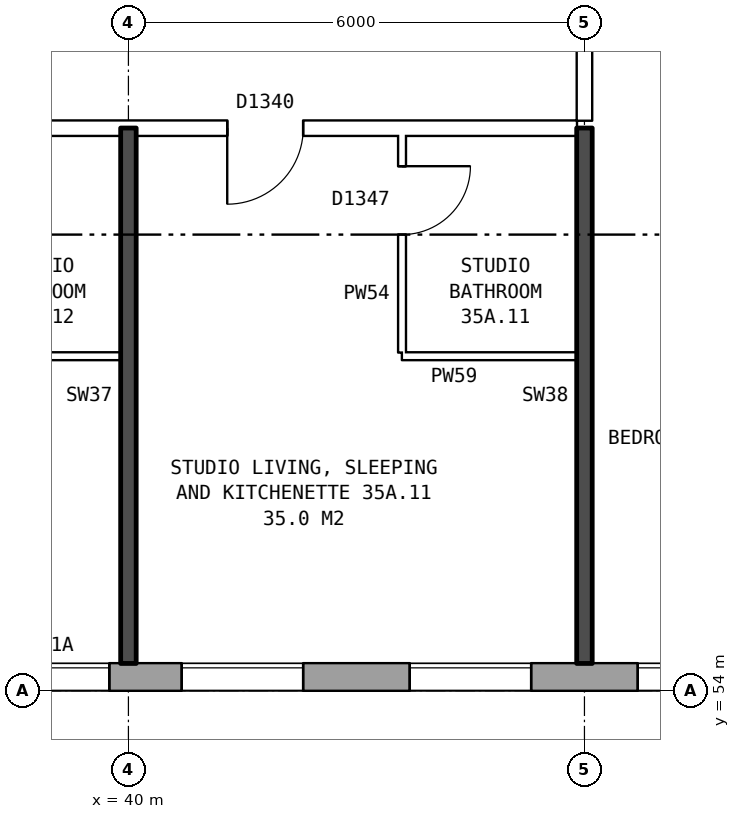
"""IFC4 building model, lengths in metres.
Left out: names, types, materials, properties, quantities, classifications, styles, units other than length and angle.
Written with IfcOpenShell. Run it as: python <this file> out.ifc"""

import sys

from ifc_helpers import new_model, si_unit, direction, frame, frame_2d, origin, place, context, subcontext, project, spatial, rectangle, extrude, element, fill, save


model = new_model("IFC4")
c1 = context("Model", 3, precision=1e-05, world=origin(), true_north=direction((0.0, 1.0)))
c2 = subcontext(c1, "Body", "Model", "MODEL_VIEW")
j1 = project(units=[si_unit("LENGTHUNIT", "METRE"), si_unit("PLANEANGLEUNIT", "RADIAN")], contexts=[c1])
p1 = place(None, origin())
s1 = spatial("IfcSite", under=j1, at=p1, CompositionType="ELEMENT")
p2 = place(p1, origin())
s2 = spatial("IfcBuilding", under=s1, at=p2, CompositionType="ELEMENT")
p3 = place(p2, frame((0.0, 0.0, 126.8)))
s3 = spatial("IfcBuildingStorey", under=s2, at=p3, CompositionType="ELEMENT", Elevation=126.8)
p4 = place(p3, frame((29.825, 54.18, 0.0), z_axis=(0.0, 0.0, 1.0), x_axis=(1.0, 0.0, 0.0)))
e1 = element("IfcWall", 1, at=p4, inside=s3, PredefinedType="STANDARD", context=c2, shape_type="SweptSolid", body=[
    extrude(rectangle(XDim=43.101, YDim=0.36, at=frame_2d((21.55, 0.0))), origin(), (0.0, 0.0, 1.0), 2.85),
])
p5 = place(p4, frame((1.875, 0.0, 0.8)))
e2 = element("IfcOpeningElement", 2, at=p5, cuts=e1, PredefinedType="OPENING", context=c2, shape_type="SweptSolid", body=[
    extrude(rectangle(XDim=1.6, YDim=1.8, at=frame_2d((0.8, 0.9))), frame((0.0, 0.19, 0.0), z_axis=(0.0, -1.0, 0.0), x_axis=(1.0, 0.0, 0.0)), (0.0, 0.0, 1.0), 0.38),
])
p6 = place(p4, frame((4.375, 0.0, 0.8)))
e3 = element("IfcOpeningElement", 3, at=p6, cuts=e1, PredefinedType="OPENING", context=c2, shape_type="SweptSolid", body=[
    extrude(rectangle(XDim=1.0, YDim=1.8, at=frame_2d((0.5, 0.9))), frame((0.0, 0.19, 0.0), z_axis=(0.0, -1.0, 0.0), x_axis=(1.0, 0.0, 0.0)), (0.0, 0.0, 1.0), 0.38),
])
p7 = place(p4, frame((5.675, 0.0, 1.6)))
e4 = element("IfcOpeningElement", 4, at=p7, cuts=e1, PredefinedType="OPENING", context=c2, shape_type="SweptSolid", body=[
    extrude(rectangle(XDim=0.6, YDim=0.9, at=frame_2d((0.3, 0.45))), frame((0.0, 0.19, 0.0), z_axis=(0.0, -1.0, 0.0), x_axis=(1.0, 0.0, 0.0)), (0.0, 0.0, 1.0), 0.38),
])
p8 = place(p4, frame((10.875, 0.0, 0.8)))
e5 = element("IfcOpeningElement", 5, at=p8, cuts=e1, PredefinedType="OPENING", context=c2, shape_type="SweptSolid", body=[
    extrude(rectangle(XDim=1.6, YDim=1.8, at=frame_2d((0.8, 0.9))), frame((0.0, 0.19, 0.0), z_axis=(0.0, -1.0, 0.0), x_axis=(1.0, 0.0, 0.0)), (0.0, 0.0, 1.0), 0.38),
])
p9 = place(p4, frame((13.875, 0.0, 0.8)))
e6 = element("IfcOpeningElement", 6, at=p9, cuts=e1, PredefinedType="OPENING", context=c2, shape_type="SweptSolid", body=[
    extrude(rectangle(XDim=1.6, YDim=1.8, at=frame_2d((0.8, 0.9))), frame((0.0, 0.19, 0.0), z_axis=(0.0, -1.0, 0.0), x_axis=(1.0, 0.0, 0.0)), (0.0, 0.0, 1.0), 0.38),
])
p10 = place(p4, frame((16.875, 0.0, 0.8)))
e7 = element("IfcOpeningElement", 7, at=p10, cuts=e1, PredefinedType="OPENING", context=c2, shape_type="SweptSolid", body=[
    extrude(rectangle(XDim=1.6, YDim=1.8, at=frame_2d((0.8, 0.9))), frame((0.0, 0.19, 0.0), z_axis=(0.0, -1.0, 0.0), x_axis=(1.0, 0.0, 0.0)), (0.0, 0.0, 1.0), 0.38),
])
p11 = place(p4, frame((19.875, 0.0, 0.8)))
e8 = element("IfcOpeningElement", 8, at=p11, cuts=e1, PredefinedType="OPENING", context=c2, shape_type="SweptSolid", body=[
    extrude(rectangle(XDim=1.6, YDim=1.8, at=frame_2d((0.8, 0.9))), frame((0.0, 0.19, 0.0), z_axis=(0.0, -1.0, 0.0), x_axis=(1.0, 0.0, 0.0)), (0.0, 0.0, 1.0), 0.38),
])
p12 = place(p4, frame((22.875, 0.0, 0.8)))
e9 = element("IfcOpeningElement", 9, at=p12, cuts=e1, PredefinedType="OPENING", context=c2, shape_type="SweptSolid", body=[
    extrude(rectangle(XDim=1.6, YDim=1.8, at=frame_2d((0.8, 0.9))), frame((0.0, 0.19, 0.0), z_axis=(0.0, -1.0, 0.0), x_axis=(1.0, 0.0, 0.0)), (0.0, 0.0, 1.0), 0.38),
])
p13 = place(p4, frame((25.875, 0.0, 0.8)))
e10 = element("IfcOpeningElement", 10, at=p13, cuts=e1, PredefinedType="OPENING", context=c2, shape_type="SweptSolid", body=[
    extrude(rectangle(XDim=1.6, YDim=1.8, at=frame_2d((0.8, 0.9))), frame((0.0, 0.19, 0.0), z_axis=(0.0, -1.0, 0.0), x_axis=(1.0, 0.0, 0.0)), (0.0, 0.0, 1.0), 0.38),
])
p14 = place(p4, frame((28.875, 0.0, 0.8)))
e11 = element("IfcOpeningElement", 11, at=p14, cuts=e1, PredefinedType="OPENING", context=c2, shape_type="SweptSolid", body=[
    extrude(rectangle(XDim=1.6, YDim=1.8, at=frame_2d((0.8, 0.9))), frame((0.0, 0.19, 0.0), z_axis=(0.0, -1.0, 0.0), x_axis=(1.0, 0.0, 0.0)), (0.0, 0.0, 1.0), 0.38),
])
p15 = place(p4, frame((31.875, 0.0, 0.8)))
e12 = element("IfcOpeningElement", 12, at=p15, cuts=e1, PredefinedType="OPENING", context=c2, shape_type="SweptSolid", body=[
    extrude(rectangle(XDim=1.6, YDim=1.8, at=frame_2d((0.8, 0.9))), frame((0.0, 0.19, 0.0), z_axis=(0.0, -1.0, 0.0), x_axis=(1.0, 0.0, 0.0)), (0.0, 0.0, 1.0), 0.38),
])
p16 = place(p4, frame((34.375, 0.0, 0.8)))
e13 = element("IfcOpeningElement", 13, at=p16, cuts=e1, PredefinedType="OPENING", context=c2, shape_type="SweptSolid", body=[
    extrude(rectangle(XDim=1.2, YDim=0.9, at=frame_2d((0.6, 0.45))), frame((0.0, 0.19, 0.0), z_axis=(0.0, -1.0, 0.0), x_axis=(1.0, 0.0, 0.0)), (0.0, 0.0, 1.0), 0.38),
])
p17 = place(p4, frame((37.875, 0.0, 0.8)))
e14 = element("IfcOpeningElement", 14, at=p17, cuts=e1, PredefinedType="OPENING", context=c2, shape_type="SweptSolid", body=[
    extrude(rectangle(XDim=1.6, YDim=1.8, at=frame_2d((0.8, 0.9))), frame((0.0, 0.19, 0.0), z_axis=(0.0, -1.0, 0.0), x_axis=(1.0, 0.0, 0.0)), (0.0, 0.0, 1.0), 0.38),
])
p18 = place(p4, frame((40.875, 0.0, 0.8)))
e15 = element("IfcOpeningElement", 15, at=p18, cuts=e1, PredefinedType="OPENING", context=c2, shape_type="SweptSolid", body=[
    extrude(rectangle(XDim=1.6, YDim=1.8, at=frame_2d((0.8, 0.9))), frame((0.0, 0.19, 0.0), z_axis=(0.0, -1.0, 0.0), x_axis=(1.0, 0.0, 0.0)), (0.0, 0.0, 1.0), 0.38),
])
p19 = place(p4, frame((7.525, 0.0, 0.8)))
e16 = element("IfcOpeningElement", 16, at=p19, cuts=e1, PredefinedType="OPENING", context=c2, shape_type="SweptSolid", body=[
    extrude(rectangle(XDim=0.6, YDim=0.9, at=frame_2d((0.3, 0.45))), frame((0.0, 0.19, 0.0), z_axis=(0.0, -1.0, 0.0), x_axis=(1.0, 0.0, 0.0)), (0.0, 0.0, 1.0), 0.38),
])
p20 = place(p4, frame((8.525, 0.0, 0.8)))
e17 = element("IfcOpeningElement", 17, at=p20, cuts=e1, PredefinedType="OPENING", context=c2, shape_type="SweptSolid", body=[
    extrude(rectangle(XDim=1.4, YDim=1.8, at=frame_2d((0.7, 0.9))), frame((0.0, 0.19, 0.0), z_axis=(0.0, -1.0, 0.0), x_axis=(1.0, 0.0, 0.0)), (0.0, 0.0, 1.0), 0.38),
])
p21 = place(p4, frame((36.725, 0.0, 1.7)))
e18 = element("IfcOpeningElement", 18, at=p21, cuts=e1, PredefinedType="OPENING", context=c2, shape_type="SweptSolid", body=[
    extrude(rectangle(XDim=0.8, YDim=0.9, at=frame_2d((0.4, 0.45))), frame((0.0, 0.19, 0.0), z_axis=(0.0, -1.0, 0.0), x_axis=(1.0, 0.0, 0.0)), (0.0, 0.0, 1.0), 0.38),
])
for number, where, z_axis, x_axis in (
    (19, (37.6, 58.4, 0.0), (0.0, 0.0, 1.0), (1.0, 0.0, 0.0)),
    (20, (43.6, 58.4, 0.0), (0.0, 0.0, 1.0), (1.0, 0.0, 0.0)),
):
    element("IfcWall", number, at=place(p3, frame(where, z_axis=z_axis, x_axis=x_axis)), inside=s3, PredefinedType="PARTITIONING", context=c2, shape_type="SweptSolid", body=[
        extrude(rectangle(XDim=2.3, YDim=0.1, at=frame_2d((1.15, 0.0))), origin(), (0.0, 0.0, 1.0), 2.85),
    ])
p22 = place(p3, frame((27.11, 61.4, 0.0), z_axis=(0.0, 0.0, 1.0), x_axis=(1.0, 0.0, 0.0)))
e21 = element("IfcWall", 21, at=p22, inside=s3, PredefinedType="PARTITIONING", context=c2, shape_type="SweptSolid", body=[
    extrude(rectangle(XDim=18.79, YDim=0.2, at=frame_2d((9.395, 0.0))), origin(), (0.0, 0.0, 1.0), 2.85),
])
p23 = place(p22, frame((14.19, 0.0, 0.0)))
e22 = element("IfcOpeningElement", 22, at=p23, cuts=e21, PredefinedType="OPENING", context=c2, shape_type="SweptSolid", body=[
    extrude(rectangle(XDim=1.0, YDim=2.1, at=frame_2d((0.5, 1.05))), frame((0.0, 0.11, 0.0), z_axis=(0.0, -1.0, 0.0), x_axis=(1.0, 0.0, 0.0)), (0.0, 0.0, 1.0), 0.22),
])
p24 = place(p22, frame((8.19, 0.0, 0.0)))
e23 = element("IfcOpeningElement", 23, at=p24, cuts=e21, PredefinedType="OPENING", context=c2, shape_type="SweptSolid", body=[
    extrude(rectangle(XDim=1.0, YDim=2.1, at=frame_2d((0.5, 1.05))), frame((0.0, 0.11, 0.0), z_axis=(0.0, -1.0, 0.0), x_axis=(1.0, 0.0, 0.0)), (0.0, 0.0, 1.0), 0.22),
])
p25 = place(p22, frame((1.745, 0.0, 0.0)))
e24 = element("IfcOpeningElement", 24, at=p25, cuts=e21, PredefinedType="OPENING", context=c2, shape_type="SweptSolid", body=[
    extrude(rectangle(XDim=1.0, YDim=2.1, at=frame_2d((0.5, 1.05))), frame((0.0, 0.11, 0.0), z_axis=(0.0, -1.0, 0.0), x_axis=(1.0, 0.0, 0.0)), (0.0, 0.0, 1.0), 0.22),
])
p26 = place(p3, frame((40.0, 54.36, 0.0), z_axis=(0.0, 0.0, 1.0), x_axis=(0.0, 1.0, 0.0)))
e25 = element("IfcWall", 25, at=p26, inside=s3, PredefinedType="SOLIDWALL", context=c2, shape_type="SweptSolid", body=[
    extrude(rectangle(XDim=7.04, YDim=0.2, at=frame_2d((3.52, 0.0))), origin(), (0.0, 0.0, 1.0), 2.85),
])
p27 = place(p3, frame((43.6, 58.45, 0.0), z_axis=(0.0, 0.0, 1.0), x_axis=(0.0, 1.0, 0.0)))
e26 = element("IfcWall", 26, at=p27, inside=s3, PredefinedType="PARTITIONING", context=c2, shape_type="SweptSolid", body=[
    extrude(rectangle(XDim=2.85, YDim=0.1, at=frame_2d((1.425, 0.0))), origin(), (0.0, 0.0, 1.0), 2.85),
])
p28 = place(p27, frame((1.55, 0.0, 0.0)))
e27 = element("IfcOpeningElement", 27, at=p28, cuts=e26, PredefinedType="OPENING", context=c2, shape_type="SweptSolid", body=[
    extrude(rectangle(XDim=0.9, YDim=2.1, at=frame_2d((0.45, 1.05))), frame((0.0, 0.06, 0.0), z_axis=(0.0, -1.0, 0.0), x_axis=(1.0, 0.0, 0.0)), (0.0, 0.0, 1.0), 0.12),
])
p29 = place(p3, frame((46.0, 54.36, 0.0), z_axis=(0.0, 0.0, 1.0), x_axis=(0.0, 1.0, 0.0)))
e28 = element("IfcWall", 28, at=p29, inside=s3, PredefinedType="SOLIDWALL", context=c2, shape_type="SweptSolid", body=[
    extrude(rectangle(XDim=7.04, YDim=0.2, at=frame_2d((3.52, 0.0))), origin(), (0.0, 0.0, 1.0), 2.85),
])
p30 = place(p3, frame((46.0, 61.5, 0.0), z_axis=(0.0, 0.0, 1.0), x_axis=(0.0, 1.0, 0.0)))
e29 = element("IfcWall", 29, at=p30, inside=s3, PredefinedType="PARTITIONING", context=c2, shape_type="SweptSolid", body=[
    extrude(rectangle(XDim=2.2, YDim=0.2, at=frame_2d((1.1, 0.0))), origin(), (0.0, 0.0, 1.0), 2.85),
])
p31 = place(p8, origin())
e30 = element("IfcWindow", 30, at=p31, inside=s3, PartitioningType="SINGLE_PANEL", PredefinedType="WINDOW", context=c2, shape_type="SweptSolid", body=[
    extrude(rectangle(XDim=1.6, YDim=1.8, at=frame_2d((0.8, 0.9))), frame((0.0, 0.15, 0.0), z_axis=(0.0, -1.0, 0.0), x_axis=(1.0, 0.0, 0.0)), (0.0, 0.0, 1.0), 0.06),
])
fill(e5, e30)
p32 = place(p9, origin())
e31 = element("IfcWindow", 31, at=p32, inside=s3, PartitioningType="SINGLE_PANEL", PredefinedType="WINDOW", context=c2, shape_type="SweptSolid", body=[
    extrude(rectangle(XDim=1.6, YDim=1.8, at=frame_2d((0.8, 0.9))), frame((0.0, 0.15, 0.0), z_axis=(0.0, -1.0, 0.0), x_axis=(1.0, 0.0, 0.0)), (0.0, 0.0, 1.0), 0.06),
])
fill(e6, e31)
p33 = place(p10, origin())
e32 = element("IfcWindow", 32, at=p33, inside=s3, PartitioningType="SINGLE_PANEL", PredefinedType="WINDOW", context=c2, shape_type="SweptSolid", body=[
    extrude(rectangle(XDim=1.6, YDim=1.8, at=frame_2d((0.8, 0.9))), frame((0.0, 0.15, 0.0), z_axis=(0.0, -1.0, 0.0), x_axis=(1.0, 0.0, 0.0)), (0.0, 0.0, 1.0), 0.06),
])
fill(e7, e32)
p34 = place(p23, frame((1.0, 0.0, 0.0), z_axis=(0.0, 0.0, 1.0), x_axis=(-1.0, 0.0, 0.0)))
e33 = element("IfcDoor", 33, at=p34, inside=s3, OperationType="SINGLE_SWING_RIGHT", PredefinedType="DOOR", context=c2, shape_type="SweptSolid", body=[
    extrude(rectangle(XDim=1.0, YDim=2.1, at=frame_2d((0.5, 1.05))), frame((0.0, 0.025, 0.0), z_axis=(0.0, -1.0, 0.0), x_axis=(1.0, 0.0, 0.0)), (0.0, 0.0, 1.0), 0.05),
])
fill(e22, e33)
p35 = place(p28, frame((0.9, 0.0, 0.0), z_axis=(0.0, 0.0, 1.0), x_axis=(-1.0, 0.0, 0.0)))
e34 = element("IfcDoor", 34, at=p35, inside=s3, OperationType="SINGLE_SWING_LEFT", PredefinedType="DOOR", context=c2, shape_type="SweptSolid", body=[
    extrude(rectangle(XDim=0.9, YDim=2.1, at=frame_2d((0.45, 1.05))), frame((0.0, 0.025, 0.0), z_axis=(0.0, -1.0, 0.0), x_axis=(1.0, 0.0, 0.0)), (0.0, 0.0, 1.0), 0.05),
])
fill(e27, e34)
p36 = place(p20, origin())
e35 = element("IfcWindow", 35, at=p36, inside=s3, PartitioningType="SINGLE_PANEL", PredefinedType="WINDOW", context=c2, shape_type="SweptSolid", body=[
    extrude(rectangle(XDim=1.4, YDim=1.8, at=frame_2d((0.7, 0.9))), frame((0.0, 0.15, 0.0), z_axis=(0.0, -1.0, 0.0), x_axis=(1.0, 0.0, 0.0)), (0.0, 0.0, 1.0), 0.06),
])
fill(e17, e35)
save(model, sys.argv[1])
